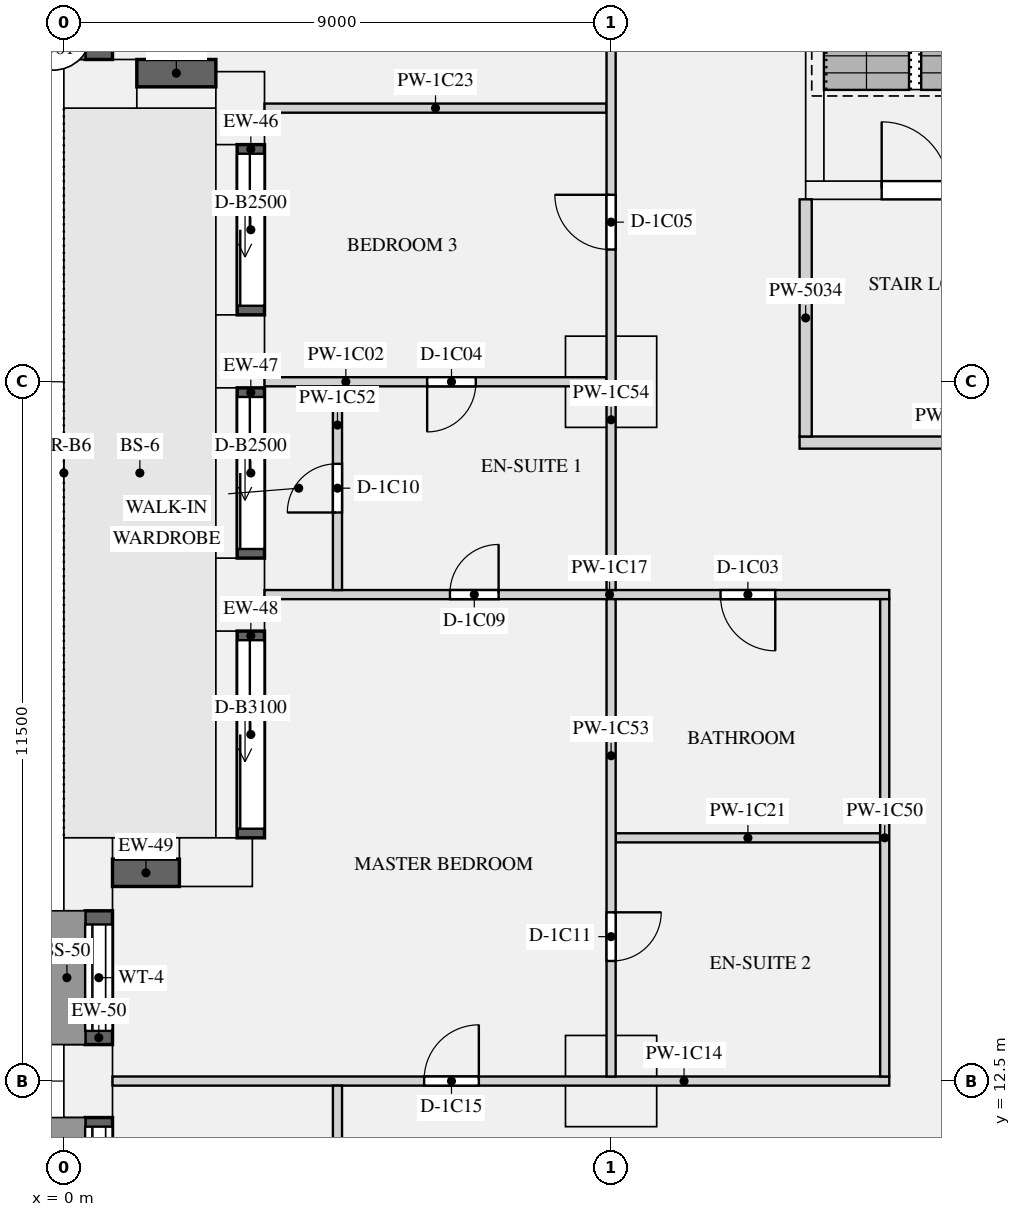
"""IFC4 building model, lengths in metres.
Left out: names, types, materials, properties, quantities, classifications, styles, units other than length and angle.
Written with IfcOpenShell. Run it as: python <this file> out.ifc"""

import sys

from ifc_helpers import new_model, si_unit, direction, frame, frame_2d, origin, origin_2d, place, context, subcontext, project, spatial, rectangle, extrude, element, fill, save


model = new_model("IFC4")
c1 = context("Model", 3, precision=1e-05, world=origin(), true_north=direction((0.0, 1.0)))
c2 = subcontext(c1, "Body", "Model", "MODEL_VIEW")
j1 = project(units=[si_unit("LENGTHUNIT", "METRE"), si_unit("PLANEANGLEUNIT", "RADIAN")], contexts=[c1])
p1 = place(None, origin())
s1 = spatial("IfcSite", under=j1, at=p1, CompositionType="ELEMENT")
p2 = place(p1, origin())
s2 = spatial("IfcBuilding", under=s1, at=p2, CompositionType="ELEMENT")
p3 = place(p2, frame((0.0, 0.0, 38.4)))
s3 = spatial("IfcBuildingStorey", under=s2, at=p3, CompositionType="ELEMENT", Elevation=38.4)
for number, where, z_axis, x_axis in (
    (1, (0.6, 28.9, 0.0), (0.0, 0.0, 1.0), (1.0, 0.0, 0.0)),
    (2, (2.9, 28.5, 0.0), (0.0, 0.0, 1.0), (0.0, -1.0, 0.0)),
    (3, (2.9, 24.5, 0.0), (0.0, 0.0, 1.0), (0.0, -1.0, 0.0)),
    (4, (2.9, 20.5, 0.0), (0.0, 0.0, 1.0), (0.0, -1.0, 0.0)),
    (5, (2.5, 16.1, 0.0), (0.0, 0.0, 1.0), (-1.0, 0.0, 0.0)),
    (6, (0.4, 15.9, 0.0), (0.0, 0.0, 1.0), (0.0, -1.0, 0.0)),
    (7, (0.4, 12.5, 0.0), (0.0, 0.0, 1.0), (0.0, -1.0, 0.0)),
):
    element("IfcColumn", number, at=place(p3, frame(where, z_axis=z_axis, x_axis=x_axis)), inside=s3, PredefinedType="USERDEFINED", context=c2, shape_type="SweptSolid", body=[
        extrude(rectangle(XDim=1.2, YDim=0.8, at=origin_2d()), origin(), (0.0, 0.0, 1.0), 3.15),
    ])
for number, where, z_axis, x_axis in (
    (8, (9.0, 24.0, 0.0), (0.0, 0.0, 1.0), (1.0, 0.0, 0.0)),
    (9, (9.0, 12.5, 0.0), (0.0, 0.0, 1.0), (1.0, 0.0, 0.0)),
):
    element("IfcColumn", number, at=place(p3, frame(where, z_axis=z_axis, x_axis=x_axis)), inside=s3, PredefinedType="COLUMN", context=c2, shape_type="SweptSolid", body=[
        extrude(rectangle(XDim=1.5, YDim=1.5, at=origin_2d()), origin(), (0.0, 0.0, 1.0), 3.15),
    ])
p4 = place(p3, frame((12.2, 27.15, 0.0), z_axis=(0.0, 0.0, 1.0), x_axis=(1.0, 0.0, 0.0)))
e10 = element("IfcWall", 10, at=p4, inside=s3, PredefinedType="SHEAR", context=c2, shape_type="SweptSolid", body=[
    extrude(rectangle(XDim=3.6, YDim=0.3, at=frame_2d((1.8, 0.0))), origin(), (0.0, 0.0, 1.0), 3.15),
])
p5 = place(p4, frame((1.25, 0.0, 0.0)))
e11 = element("IfcOpeningElement", 11, at=p5, cuts=e10, PredefinedType="OPENING", context=c2, shape_type="SweptSolid", body=[
    extrude(rectangle(XDim=1.1, YDim=2.1, at=frame_2d((0.55, 1.05))), frame((0.0, 0.16, 0.0), z_axis=(0.0, -1.0, 0.0), x_axis=(1.0, 0.0, 0.0)), (0.0, 0.0, 1.0), 0.32),
])
p6 = place(p3, frame((12.35, 27.3, 0.0), z_axis=(0.0, 0.0, 1.0), x_axis=(0.0, 1.0, 0.0)))
e12 = element("IfcWall", 12, at=p6, inside=s3, PredefinedType="SHEAR", context=c2, shape_type="SweptSolid", body=[
    extrude(rectangle(XDim=7.8, YDim=0.3, at=frame_2d((3.9, 0.0))), origin(), (0.0, 0.0, 1.0), 3.15),
])
p7 = place(p3, frame((0.575, 31.775, 0.9), z_axis=(0.0, 0.0, 1.0), x_axis=(0.0, -1.0, 0.0)))
e13 = element("IfcWall", 13, at=p7, inside=s3, PredefinedType="SOLIDWALL", context=c2, shape_type="SweptSolid", body=[
    extrude(rectangle(XDim=2.475, YDim=0.45, at=frame_2d((1.237, 0.0))), origin(), (0.0, 0.0, 1.0), 1.93),
])
p8 = place(p7, frame((0.238, 0.0, 0.15)))
e14 = element("IfcOpeningElement", 14, at=p8, cuts=e13, PredefinedType="OPENING", context=c2, shape_type="SweptSolid", body=[
    extrude(rectangle(XDim=2.0, YDim=1.5, at=frame_2d((1.0, 0.75))), frame((0.0, 0.235, 0.0), z_axis=(0.0, -1.0, 0.0), x_axis=(1.0, 0.0, 0.0)), (0.0, 0.0, 1.0), 0.47),
])
p9 = place(p3, frame((1.2, 29.075, 0.9), z_axis=(0.0, 0.0, 1.0), x_axis=(1.0, 0.0, 0.0)))
e15 = element("IfcWall", 15, at=p9, inside=s3, PredefinedType="SOLIDWALL", context=c2, shape_type="SweptSolid", body=[
    extrude(rectangle(XDim=1.3, YDim=0.45, at=frame_2d((0.65, 0.0))), origin(), (0.0, 0.0, 1.0), 1.93),
])
p10 = place(p3, frame((3.075, 27.9, 0.0), z_axis=(0.0, 0.0, 1.0), x_axis=(0.0, -1.0, 0.0)))
e16 = element("IfcWall", 16, at=p10, inside=s3, PredefinedType="SOLIDWALL", context=c2, shape_type="SweptSolid", body=[
    extrude(rectangle(XDim=2.8, YDim=0.45, at=frame_2d((1.4, 0.0))), origin(), (0.0, 0.0, 1.0), 2.83),
])
p11 = place(p10, frame((0.15, 0.0, 0.0)))
e17 = element("IfcOpeningElement", 17, at=p11, cuts=e16, PredefinedType="OPENING", context=c2, shape_type="SweptSolid", body=[
    extrude(rectangle(XDim=2.5, YDim=2.3, at=frame_2d((1.25, 1.15))), frame((0.0, 0.235, 0.0), z_axis=(0.0, -1.0, 0.0), x_axis=(1.0, 0.0, 0.0)), (0.0, 0.0, 1.0), 0.47),
])
p12 = place(p3, frame((3.075, 23.9, 0.0), z_axis=(0.0, 0.0, 1.0), x_axis=(0.0, -1.0, 0.0)))
e18 = element("IfcWall", 18, at=p12, inside=s3, PredefinedType="SOLIDWALL", context=c2, shape_type="SweptSolid", body=[
    extrude(rectangle(XDim=2.8, YDim=0.45, at=frame_2d((1.4, 0.0))), origin(), (0.0, 0.0, 1.0), 2.83),
])
p13 = place(p12, frame((0.15, 0.0, 0.0)))
e19 = element("IfcOpeningElement", 19, at=p13, cuts=e18, PredefinedType="OPENING", context=c2, shape_type="SweptSolid", body=[
    extrude(rectangle(XDim=2.5, YDim=2.3, at=frame_2d((1.25, 1.15))), frame((0.0, 0.235, 0.0), z_axis=(0.0, -1.0, 0.0), x_axis=(1.0, 0.0, 0.0)), (0.0, 0.0, 1.0), 0.47),
])
p14 = place(p3, frame((3.075, 19.9, 0.0), z_axis=(0.0, 0.0, 1.0), x_axis=(0.0, -1.0, 0.0)))
e20 = element("IfcWall", 20, at=p14, inside=s3, PredefinedType="SOLIDWALL", context=c2, shape_type="SweptSolid", body=[
    extrude(rectangle(XDim=3.4, YDim=0.45, at=frame_2d((1.7, 0.0))), origin(), (0.0, 0.0, 1.0), 2.83),
])
p15 = place(p14, frame((0.15, 0.0, 0.0)))
e21 = element("IfcOpeningElement", 21, at=p15, cuts=e20, PredefinedType="OPENING", context=c2, shape_type="SweptSolid", body=[
    extrude(rectangle(XDim=3.1, YDim=2.3, at=frame_2d((1.55, 1.15))), frame((0.0, 0.235, 0.0), z_axis=(0.0, -1.0, 0.0), x_axis=(1.0, 0.0, 0.0)), (0.0, 0.0, 1.0), 0.47),
])
p16 = place(p3, frame((1.9, 15.925, 0.9), z_axis=(0.0, 0.0, 1.0), x_axis=(-1.0, 0.0, 0.0)))
e22 = element("IfcWall", 22, at=p16, inside=s3, PredefinedType="SOLIDWALL", context=c2, shape_type="SweptSolid", body=[
    extrude(rectangle(XDim=1.1, YDim=0.45, at=frame_2d((0.55, 0.0))), origin(), (0.0, 0.0, 1.0), 1.93),
])
p17 = place(p3, frame((0.575, 15.3, 0.9), z_axis=(0.0, 0.0, 1.0), x_axis=(0.0, -1.0, 0.0)))
e23 = element("IfcWall", 23, at=p17, inside=s3, PredefinedType="SOLIDWALL", context=c2, shape_type="SweptSolid", body=[
    extrude(rectangle(XDim=2.2, YDim=0.45, at=frame_2d((1.1, 0.0))), origin(), (0.0, 0.0, 1.0), 1.93),
])
p18 = place(p17, frame((0.225, 0.0, 0.15)))
e24 = element("IfcOpeningElement", 24, at=p18, cuts=e23, PredefinedType="OPENING", context=c2, shape_type="SweptSolid", body=[
    extrude(rectangle(XDim=1.75, YDim=1.5, at=frame_2d((0.875, 0.75))), frame((0.0, 0.235, 0.0), z_axis=(0.0, -1.0, 0.0), x_axis=(1.0, 0.0, 0.0)), (0.0, 0.0, 1.0), 0.47),
])
p19 = place(p3, frame((0.575, 11.9, 0.9), z_axis=(0.0, 0.0, 1.0), x_axis=(0.0, -1.0, 0.0)))
e25 = element("IfcWall", 25, at=p19, inside=s3, PredefinedType="SOLIDWALL", context=c2, shape_type="SweptSolid", body=[
    extrude(rectangle(XDim=2.8, YDim=0.45, at=frame_2d((1.4, 0.0))), origin(), (0.0, 0.0, 1.0), 1.93),
])
p20 = place(p19, frame((0.15, 0.0, 0.15)))
e26 = element("IfcOpeningElement", 26, at=p20, cuts=e25, PredefinedType="OPENING", context=c2, shape_type="SweptSolid", body=[
    extrude(rectangle(XDim=2.5, YDim=1.5, at=frame_2d((1.25, 0.75))), frame((0.0, 0.235, 0.0), z_axis=(0.0, -1.0, 0.0), x_axis=(1.0, 0.0, 0.0)), (0.0, 0.0, 1.0), 0.47),
])
p21 = place(p3, frame((12.1, 23.0, 0.0), z_axis=(0.0, 0.0, 1.0), x_axis=(1.0, 0.0, 0.0)))
e27 = element("IfcWall", 27, at=p21, inside=s3, PredefinedType="PARTITIONING", context=c2, shape_type="SweptSolid", body=[
    extrude(rectangle(XDim=5.0, YDim=0.2, at=frame_2d((2.5, 0.0))), origin(), (0.0, 0.0, 1.0), 2.83),
])
p22 = place(p3, frame((12.2, 23.1, 0.0), z_axis=(0.0, 0.0, 1.0), x_axis=(0.0, 1.0, 0.0)))
e28 = element("IfcWall", 28, at=p22, inside=s3, PredefinedType="PARTITIONING", context=c2, shape_type="SweptSolid", body=[
    extrude(rectangle(XDim=3.9, YDim=0.2, at=frame_2d((1.95, 0.0))), origin(), (0.0, 0.0, 1.0), 2.83),
])
p23 = place(p3, frame((3.3, 24.0, 0.0), z_axis=(0.0, 0.0, 1.0), x_axis=(1.0, 0.0, 0.0)))
e29 = element("IfcWall", 29, at=p23, inside=s3, PredefinedType="PARTITIONING", context=c2, shape_type="SweptSolid", body=[
    extrude(rectangle(XDim=5.625, YDim=0.15, at=frame_2d((2.812, 0.0))), origin(), (0.0, 0.0, 1.0), 2.83),
])
p24 = place(p23, frame((2.675, 0.0, 0.0)))
e30 = element("IfcOpeningElement", 30, at=p24, cuts=e29, PredefinedType="OPENING", context=c2, shape_type="SweptSolid", body=[
    extrude(rectangle(XDim=0.8, YDim=2.1, at=frame_2d((0.4, 1.05))), frame((0.0, 0.085, 0.0), z_axis=(0.0, -1.0, 0.0), x_axis=(1.0, 0.0, 0.0)), (0.0, 0.0, 1.0), 0.17),
])
p25 = place(p3, frame((0.8, 12.5, 0.0), z_axis=(0.0, 0.0, 1.0), x_axis=(1.0, 0.0, 0.0)))
e31 = element("IfcWall", 31, at=p25, inside=s3, PredefinedType="PARTITIONING", context=c2, shape_type="SweptSolid", body=[
    extrude(rectangle(XDim=12.775, YDim=0.15, at=frame_2d((6.387, 0.0))), origin(), (0.0, 0.0, 1.0), 2.83),
])
p26 = place(p25, frame((5.125, 0.0, 0.0)))
e32 = element("IfcOpeningElement", 32, at=p26, cuts=e31, PredefinedType="OPENING", context=c2, shape_type="SweptSolid", body=[
    extrude(rectangle(XDim=0.9, YDim=2.1, at=frame_2d((0.45, 1.05))), frame((0.0, 0.085, 0.0), z_axis=(0.0, -1.0, 0.0), x_axis=(1.0, 0.0, 0.0)), (0.0, 0.0, 1.0), 0.17),
])
p27 = place(p3, frame((3.3, 20.5, 0.0), z_axis=(0.0, 0.0, 1.0), x_axis=(1.0, 0.0, 0.0)))
e33 = element("IfcWall", 33, at=p27, inside=s3, PredefinedType="PARTITIONING", context=c2, shape_type="SweptSolid", body=[
    extrude(rectangle(XDim=10.275, YDim=0.15, at=frame_2d((5.137, 0.0))), origin(), (0.0, 0.0, 1.0), 2.83),
])
p28 = place(p27, frame((7.5, 0.0, 0.0)))
e34 = element("IfcOpeningElement", 34, at=p28, cuts=e33, PredefinedType="OPENING", context=c2, shape_type="SweptSolid", body=[
    extrude(rectangle(XDim=0.9, YDim=2.1, at=frame_2d((0.45, 1.05))), frame((0.0, 0.085, 0.0), z_axis=(0.0, -1.0, 0.0), x_axis=(1.0, 0.0, 0.0)), (0.0, 0.0, 1.0), 0.17),
])
p29 = place(p27, frame((3.05, 0.0, 0.0)))
e35 = element("IfcOpeningElement", 35, at=p29, cuts=e33, PredefinedType="OPENING", context=c2, shape_type="SweptSolid", body=[
    extrude(rectangle(XDim=0.8, YDim=2.1, at=frame_2d((0.4, 1.05))), frame((0.0, 0.085, 0.0), z_axis=(0.0, -1.0, 0.0), x_axis=(1.0, 0.0, 0.0)), (0.0, 0.0, 1.0), 0.17),
])
p30 = place(p3, frame((9.075, 16.5, 0.0), z_axis=(0.0, 0.0, 1.0), x_axis=(1.0, 0.0, 0.0)))
e36 = element("IfcWall", 36, at=p30, inside=s3, PredefinedType="PARTITIONING", context=c2, shape_type="SweptSolid", body=[
    extrude(rectangle(XDim=4.35, YDim=0.15, at=frame_2d((2.175, 0.0))), origin(), (0.0, 0.0, 1.0), 2.83),
])
p31 = place(p3, frame((3.3, 28.5, 0.0), z_axis=(0.0, 0.0, 1.0), x_axis=(1.0, 0.0, 0.0)))
e37 = element("IfcWall", 37, at=p31, inside=s3, PredefinedType="PARTITIONING", context=c2, shape_type="SweptSolid", body=[
    extrude(rectangle(XDim=5.625, YDim=0.15, at=frame_2d((2.812, 0.0))), origin(), (0.0, 0.0, 1.0), 2.83),
])
p32 = place(p3, frame((13.5, 12.575, 0.0), z_axis=(0.0, 0.0, 1.0), x_axis=(0.0, 1.0, 0.0)))
e38 = element("IfcWall", 38, at=p32, inside=s3, PredefinedType="PARTITIONING", context=c2, shape_type="SweptSolid", body=[
    extrude(rectangle(XDim=7.85, YDim=0.15, at=frame_2d((3.925, 0.0))), origin(), (0.0, 0.0, 1.0), 2.83),
])
p33 = place(p3, frame((4.5, 5.3, 0.0), z_axis=(0.0, 0.0, 1.0), x_axis=(0.0, 1.0, 0.0)))
e39 = element("IfcWall", 39, at=p33, inside=s3, PredefinedType="PARTITIONING", context=c2, shape_type="SweptSolid", body=[
    extrude(rectangle(XDim=7.125, YDim=0.15, at=frame_2d((3.562, 0.0))), origin(), (0.0, 0.0, 1.0), 2.83),
])
p34 = place(p33, frame((4.75, 0.0, 0.0)))
e40 = element("IfcOpeningElement", 40, at=p34, cuts=e39, PredefinedType="OPENING", context=c2, shape_type="SweptSolid", body=[
    extrude(rectangle(XDim=0.9, YDim=2.1, at=frame_2d((0.45, 1.05))), frame((0.0, 0.085, 0.0), z_axis=(0.0, -1.0, 0.0), x_axis=(1.0, 0.0, 0.0)), (0.0, 0.0, 1.0), 0.17),
])
p35 = place(p33, frame((0.775, 0.0, 0.0)))
e41 = element("IfcOpeningElement", 41, at=p35, cuts=e39, PredefinedType="OPENING", context=c2, shape_type="SweptSolid", body=[
    extrude(rectangle(XDim=1.5, YDim=2.1, at=frame_2d((0.75, 1.05))), frame((0.0, 0.085, 0.0), z_axis=(0.0, -1.0, 0.0), x_axis=(1.0, 0.0, 0.0)), (0.0, 0.0, 1.0), 0.17),
])
p36 = place(p3, frame((4.5, 20.575, 0.0), z_axis=(0.0, 0.0, 1.0), x_axis=(0.0, 1.0, 0.0)))
e42 = element("IfcWall", 42, at=p36, inside=s3, PredefinedType="PARTITIONING", context=c2, shape_type="SweptSolid", body=[
    extrude(rectangle(XDim=3.35, YDim=0.15, at=frame_2d((1.675, 0.0))), origin(), (0.0, 0.0, 1.0), 2.83),
])
p37 = place(p36, frame((1.275, 0.0, 0.0)))
e43 = element("IfcOpeningElement", 43, at=p37, cuts=e42, PredefinedType="OPENING", context=c2, shape_type="SweptSolid", body=[
    extrude(rectangle(XDim=0.8, YDim=2.1, at=frame_2d((0.4, 1.05))), frame((0.0, 0.085, 0.0), z_axis=(0.0, -1.0, 0.0), x_axis=(1.0, 0.0, 0.0)), (0.0, 0.0, 1.0), 0.17),
])
p38 = place(p3, frame((9.0, 12.575, 0.0), z_axis=(0.0, 0.0, 1.0), x_axis=(0.0, 1.0, 0.0)))
e44 = element("IfcWall", 44, at=p38, inside=s3, PredefinedType="PARTITIONING", context=c2, shape_type="SweptSolid", body=[
    extrude(rectangle(XDim=7.85, YDim=0.15, at=frame_2d((3.925, 0.0))), origin(), (0.0, 0.0, 1.0), 2.83),
])
p39 = place(p38, frame((1.9, 0.0, 0.0)))
e45 = element("IfcOpeningElement", 45, at=p39, cuts=e44, PredefinedType="OPENING", context=c2, shape_type="SweptSolid", body=[
    extrude(rectangle(XDim=0.8, YDim=2.1, at=frame_2d((0.4, 1.05))), frame((0.0, 0.085, 0.0), z_axis=(0.0, -1.0, 0.0), x_axis=(1.0, 0.0, 0.0)), (0.0, 0.0, 1.0), 0.17),
])
p40 = place(p3, frame((9.0, 20.575, 0.0), z_axis=(0.0, 0.0, 1.0), x_axis=(0.0, 1.0, 0.0)))
e46 = element("IfcWall", 46, at=p40, inside=s3, PredefinedType="PARTITIONING", context=c2, shape_type="SweptSolid", body=[
    extrude(rectangle(XDim=11.725, YDim=0.15, at=frame_2d((5.863, 0.0))), origin(), (0.0, 0.0, 1.0), 2.83),
])
p41 = place(p40, frame((5.6, 0.0, 0.0)))
e47 = element("IfcOpeningElement", 47, at=p41, cuts=e46, PredefinedType="OPENING", context=c2, shape_type="SweptSolid", body=[
    extrude(rectangle(XDim=0.9, YDim=2.1, at=frame_2d((0.45, 1.05))), frame((0.0, 0.085, 0.0), z_axis=(0.0, -1.0, 0.0), x_axis=(1.0, 0.0, 0.0)), (0.0, 0.0, 1.0), 0.17),
])
p42 = place(p40, frame((9.413, 0.0, 0.0)))
e48 = element("IfcOpeningElement", 48, at=p42, cuts=e46, PredefinedType="OPENING", context=c2, shape_type="SweptSolid", body=[
    extrude(rectangle(XDim=0.9, YDim=2.1, at=frame_2d((0.45, 1.05))), frame((0.0, 0.085, 0.0), z_axis=(0.0, -1.0, 0.0), x_axis=(1.0, 0.0, 0.0)), (0.0, 0.0, 1.0), 0.17),
])
p43 = place(p11, origin())
e49 = element("IfcDoor", 49, at=p43, inside=s3, OperationType="SLIDING_TO_LEFT", PredefinedType="DOOR", context=c2, shape_type="SweptSolid", body=[
    extrude(rectangle(XDim=2.5, YDim=2.3, at=frame_2d((1.25, 1.15))), frame((0.0, -0.07, 0.0), z_axis=(0.0, -1.0, 0.0), x_axis=(1.0, 0.0, 0.0)), (0.0, 0.0, 1.0), 0.05),
])
fill(e17, e49)
p44 = place(p13, origin())
e50 = element("IfcDoor", 50, at=p44, inside=s3, OperationType="SLIDING_TO_LEFT", PredefinedType="DOOR", context=c2, shape_type="SweptSolid", body=[
    extrude(rectangle(XDim=2.5, YDim=2.3, at=frame_2d((1.25, 1.15))), frame((0.0, -0.07, 0.0), z_axis=(0.0, -1.0, 0.0), x_axis=(1.0, 0.0, 0.0)), (0.0, 0.0, 1.0), 0.05),
])
fill(e19, e50)
p45 = place(p15, origin())
e51 = element("IfcDoor", 51, at=p45, inside=s3, OperationType="SLIDING_TO_LEFT", PredefinedType="DOOR", context=c2, shape_type="SweptSolid", body=[
    extrude(rectangle(XDim=3.1, YDim=2.3, at=frame_2d((1.55, 1.15))), frame((0.0, -0.07, 0.0), z_axis=(0.0, -1.0, 0.0), x_axis=(1.0, 0.0, 0.0)), (0.0, 0.0, 1.0), 0.05),
])
fill(e21, e51)
p46 = place(p18, origin())
e52 = element("IfcWindow", 52, at=p46, inside=s3, PartitioningType="SINGLE_PANEL", PredefinedType="WINDOW", context=c2, shape_type="SweptSolid", body=[
    extrude(rectangle(XDim=1.75, YDim=1.5, at=frame_2d((0.875, 0.75))), frame((0.0, -0.065, 0.0), z_axis=(0.0, -1.0, 0.0), x_axis=(1.0, 0.0, 0.0)), (0.0, 0.0, 1.0), 0.06),
])
fill(e24, e52)
p47 = place(p20, origin())
e53 = element("IfcWindow", 53, at=p47, inside=s3, PartitioningType="SINGLE_PANEL", PredefinedType="WINDOW", context=c2, shape_type="SweptSolid", body=[
    extrude(rectangle(XDim=2.5, YDim=1.5, at=frame_2d((1.25, 0.75))), frame((0.0, -0.065, 0.0), z_axis=(0.0, -1.0, 0.0), x_axis=(1.0, 0.0, 0.0)), (0.0, 0.0, 1.0), 0.06),
])
fill(e26, e53)
p48 = place(p5, origin())
e54 = element("IfcDoor", 54, at=p48, inside=s3, OperationType="SINGLE_SWING_LEFT", PredefinedType="DOOR", context=c2, shape_type="SweptSolid", body=[
    extrude(rectangle(XDim=1.1, YDim=2.1, at=frame_2d((0.55, 1.05))), frame((0.0, 0.025, 0.0), z_axis=(0.0, -1.0, 0.0), x_axis=(1.0, 0.0, 0.0)), (0.0, 0.0, 1.0), 0.05),
])
fill(e11, e54)
p49 = place(p28, frame((0.9, 0.0, 0.0), z_axis=(0.0, 0.0, 1.0), x_axis=(-1.0, 0.0, 0.0)))
e55 = element("IfcDoor", 55, at=p49, inside=s3, OperationType="SINGLE_SWING_LEFT", PredefinedType="DOOR", context=c2, shape_type="SweptSolid", body=[
    extrude(rectangle(XDim=0.9, YDim=2.1, at=frame_2d((0.45, 1.05))), frame((0.0, 0.025, 0.0), z_axis=(0.0, -1.0, 0.0), x_axis=(1.0, 0.0, 0.0)), (0.0, 0.0, 1.0), 0.05),
])
fill(e34, e55)
p50 = place(p24, frame((0.8, 0.0, 0.0), z_axis=(0.0, 0.0, 1.0), x_axis=(-1.0, 0.0, 0.0)))
e56 = element("IfcDoor", 56, at=p50, inside=s3, OperationType="SINGLE_SWING_RIGHT", PredefinedType="DOOR", context=c2, shape_type="SweptSolid", body=[
    extrude(rectangle(XDim=0.8, YDim=2.1, at=frame_2d((0.4, 1.05))), frame((0.0, 0.025, 0.0), z_axis=(0.0, -1.0, 0.0), x_axis=(1.0, 0.0, 0.0)), (0.0, 0.0, 1.0), 0.05),
])
fill(e30, e56)
p51 = place(p41, origin())
e57 = element("IfcDoor", 57, at=p51, inside=s3, OperationType="SINGLE_SWING_RIGHT", PredefinedType="DOOR", context=c2, shape_type="SweptSolid", body=[
    extrude(rectangle(XDim=0.9, YDim=2.1, at=frame_2d((0.45, 1.05))), frame((0.0, 0.025, 0.0), z_axis=(0.0, -1.0, 0.0), x_axis=(1.0, 0.0, 0.0)), (0.0, 0.0, 1.0), 0.05),
])
fill(e47, e57)
p52 = place(p29, origin())
e58 = element("IfcDoor", 58, at=p52, inside=s3, OperationType="SINGLE_SWING_RIGHT", PredefinedType="DOOR", context=c2, shape_type="SweptSolid", body=[
    extrude(rectangle(XDim=0.8, YDim=2.1, at=frame_2d((0.4, 1.05))), frame((0.0, 0.025, 0.0), z_axis=(0.0, -1.0, 0.0), x_axis=(1.0, 0.0, 0.0)), (0.0, 0.0, 1.0), 0.05),
])
fill(e35, e58)
p53 = place(p37, origin())
e59 = element("IfcDoor", 59, at=p53, inside=s3, OperationType="SINGLE_SWING_LEFT", PredefinedType="DOOR", context=c2, shape_type="SweptSolid", body=[
    extrude(rectangle(XDim=0.8, YDim=2.1, at=frame_2d((0.4, 1.05))), frame((0.0, 0.025, 0.0), z_axis=(0.0, -1.0, 0.0), x_axis=(1.0, 0.0, 0.0)), (0.0, 0.0, 1.0), 0.05),
])
fill(e43, e59)
p54 = place(p39, frame((0.8, 0.0, 0.0), z_axis=(0.0, 0.0, 1.0), x_axis=(-1.0, 0.0, 0.0)))
e60 = element("IfcDoor", 60, at=p54, inside=s3, OperationType="SINGLE_SWING_LEFT", PredefinedType="DOOR", context=c2, shape_type="SweptSolid", body=[
    extrude(rectangle(XDim=0.8, YDim=2.1, at=frame_2d((0.4, 1.05))), frame((0.0, 0.025, 0.0), z_axis=(0.0, -1.0, 0.0), x_axis=(1.0, 0.0, 0.0)), (0.0, 0.0, 1.0), 0.05),
])
fill(e45, e60)
p55 = place(p26, origin())
e61 = element("IfcDoor", 61, at=p55, inside=s3, OperationType="SINGLE_SWING_RIGHT", PredefinedType="DOOR", context=c2, shape_type="SweptSolid", body=[
    extrude(rectangle(XDim=0.9, YDim=2.1, at=frame_2d((0.45, 1.05))), frame((0.0, 0.025, 0.0), z_axis=(0.0, -1.0, 0.0), x_axis=(1.0, 0.0, 0.0)), (0.0, 0.0, 1.0), 0.05),
])
fill(e32, e61)
save(model, sys.argv[1])
